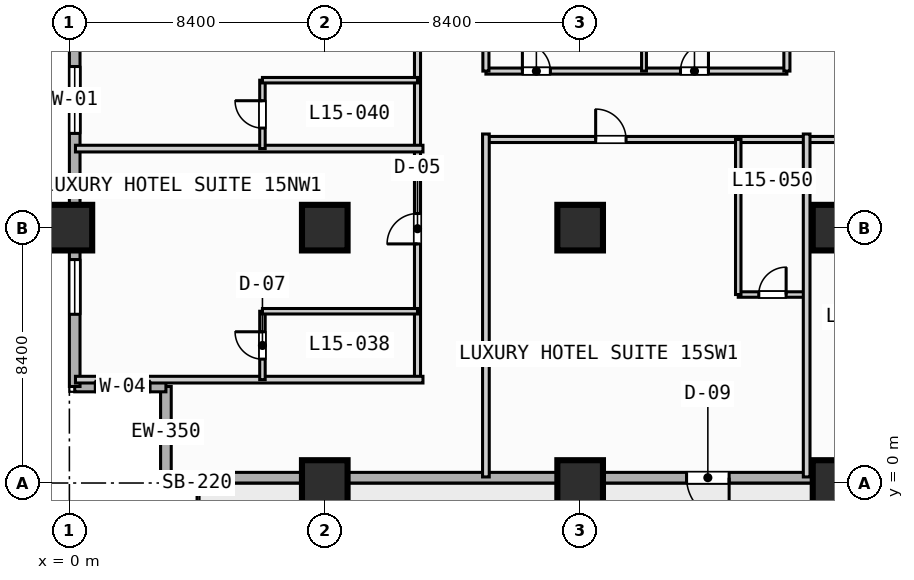
"""IFC4 building model, lengths in metres.
Left out: names, types, materials, properties, quantities, classifications, styles, units other than length and angle.
Written with IfcOpenShell. Run it as: python <this file> out.ifc"""

import sys

from ifc_helpers import new_model, si_unit, direction, frame, frame_2d, origin, origin_2d, place, context, subcontext, project, spatial, rectangle, extrude, element, fill, save


model = new_model("IFC4")
c1 = context("Model", 3, precision=1e-05, world=origin(), true_north=direction((0.0, 1.0)))
c2 = subcontext(c1, "Body", "Model", "MODEL_VIEW")
j1 = project(units=[si_unit("LENGTHUNIT", "METRE"), si_unit("PLANEANGLEUNIT", "RADIAN")], contexts=[c1])
p1 = place(None, origin())
s1 = spatial("IfcSite", under=j1, at=p1, CompositionType="ELEMENT")
p2 = place(p1, origin())
s2 = spatial("IfcBuilding", under=s1, at=p2, CompositionType="ELEMENT")
p3 = place(p2, frame((0.0, 0.0, 66.2)))
s3 = spatial("IfcBuildingStorey", under=s2, at=p3, CompositionType="ELEMENT", Elevation=66.2)
for number, where, z_axis, x_axis in (
    (1, (0.0, 8.4, 0.0), (0.0, 0.0, 1.0), (1.0, 0.0, 0.0)),
    (2, (8.4, 0.0, 0.0), (0.0, 0.0, 1.0), (1.0, 0.0, 0.0)),
    (3, (8.4, 8.4, 0.0), (0.0, 0.0, 1.0), (1.0, 0.0, 0.0)),
    (4, (16.8, 0.0, 0.0), (0.0, 0.0, 1.0), (1.0, 0.0, 0.0)),
    (5, (16.8, 8.4, 0.0), (0.0, 0.0, 1.0), (1.0, 0.0, 0.0)),
    (6, (25.2, 0.0, 0.0), (0.0, 0.0, 1.0), (1.0, 0.0, 0.0)),
    (7, (25.2, 8.4, 0.0), (0.0, 0.0, 1.0), (1.0, 0.0, 0.0)),
):
    element("IfcColumn", number, at=place(p3, frame(where, z_axis=z_axis, x_axis=x_axis)), inside=s3, PredefinedType="COLUMN", context=c2, shape_type="SweptSolid", body=[
        extrude(rectangle(XDim=1.5, YDim=1.5, at=origin_2d()), origin(), (0.0, 0.0, 1.0), 3.8),
    ])
p4 = place(p3, frame((3.175, 0.175, 0.0), z_axis=(0.0, 0.0, 1.0), x_axis=(0.0, 1.0, 0.0)))
e8 = element("IfcWall", 8, at=p4, inside=s3, PredefinedType="STANDARD", context=c2, shape_type="SweptSolid", body=[
    extrude(rectangle(XDim=3.0, YDim=0.35, at=frame_2d((1.5, 0.0))), origin(), (0.0, 0.0, 1.0), 3.55),
])
p5 = place(p3, frame((3.175, 3.175, 0.0), z_axis=(0.0, 0.0, 1.0), x_axis=(-1.0, 0.0, 0.0)))
e9 = element("IfcWall", 9, at=p5, inside=s3, PredefinedType="STANDARD", context=c2, shape_type="SweptSolid", body=[
    extrude(rectangle(XDim=3.0, YDim=0.35, at=frame_2d((1.5, 0.0))), origin(), (0.0, 0.0, 1.0), 3.55),
])
p6 = place(p5, frame((0.522, 0.0, 0.85)))
e10 = element("IfcOpeningElement", 10, at=p6, cuts=e9, PredefinedType="OPENING", context=c2, shape_type="SweptSolid", body=[
    extrude(rectangle(XDim=1.8, YDim=1.8, at=frame_2d((0.9, 0.9))), frame((0.0, 0.185, 0.0), z_axis=(0.0, -1.0, 0.0), x_axis=(1.0, 0.0, 0.0)), (0.0, 0.0, 1.0), 0.37),
])
p7 = place(p3, frame((0.175, 3.175, 0.0), z_axis=(0.0, 0.0, 1.0), x_axis=(0.0, 1.0, 0.0)))
e11 = element("IfcWall", 11, at=p7, inside=s3, PredefinedType="STANDARD", context=c2, shape_type="SweptSolid", body=[
    extrude(rectangle(XDim=86.05, YDim=0.35, at=frame_2d((43.025, 0.0))), origin(), (0.0, 0.0, 1.0), 3.55),
])
p8 = place(p7, frame((42.325, 0.0, 0.0)))
e12 = element("IfcOpeningElement", 12, at=p8, cuts=e11, PredefinedType="OPENING", context=c2, shape_type="SweptSolid", body=[
    extrude(rectangle(XDim=1.4, YDim=2.2, at=frame_2d((0.7, 1.1))), frame((0.0, 0.185, 0.0), z_axis=(0.0, -1.0, 0.0), x_axis=(1.0, 0.0, 0.0)), (0.0, 0.0, 1.0), 0.37),
])
p9 = place(p7, frame((8.325, 0.0, 0.85)))
e13 = element("IfcOpeningElement", 13, at=p9, cuts=e11, PredefinedType="OPENING", context=c2, shape_type="SweptSolid", body=[
    extrude(rectangle(XDim=2.2, YDim=1.8, at=frame_2d((1.1, 0.9))), frame((0.0, 0.185, 0.0), z_axis=(0.0, -1.0, 0.0), x_axis=(1.0, 0.0, 0.0)), (0.0, 0.0, 1.0), 0.37),
])
p10 = place(p7, frame((16.725, 0.0, 0.85)))
e14 = element("IfcOpeningElement", 14, at=p10, cuts=e11, PredefinedType="OPENING", context=c2, shape_type="SweptSolid", body=[
    extrude(rectangle(XDim=2.2, YDim=1.8, at=frame_2d((1.1, 0.9))), frame((0.0, 0.185, 0.0), z_axis=(0.0, -1.0, 0.0), x_axis=(1.0, 0.0, 0.0)), (0.0, 0.0, 1.0), 0.37),
])
p11 = place(p7, frame((25.125, 0.0, 0.85)))
e15 = element("IfcOpeningElement", 15, at=p11, cuts=e11, PredefinedType="OPENING", context=c2, shape_type="SweptSolid", body=[
    extrude(rectangle(XDim=2.2, YDim=1.8, at=frame_2d((1.1, 0.9))), frame((0.0, 0.185, 0.0), z_axis=(0.0, -1.0, 0.0), x_axis=(1.0, 0.0, 0.0)), (0.0, 0.0, 1.0), 0.37),
])
p12 = place(p7, frame((33.525, 0.0, 0.85)))
e16 = element("IfcOpeningElement", 16, at=p12, cuts=e11, PredefinedType="OPENING", context=c2, shape_type="SweptSolid", body=[
    extrude(rectangle(XDim=2.2, YDim=1.8, at=frame_2d((1.1, 0.9))), frame((0.0, 0.185, 0.0), z_axis=(0.0, -1.0, 0.0), x_axis=(1.0, 0.0, 0.0)), (0.0, 0.0, 1.0), 0.37),
])
p13 = place(p7, frame((2.375, 0.0, 0.85)))
e17 = element("IfcOpeningElement", 17, at=p13, cuts=e11, PredefinedType="OPENING", context=c2, shape_type="SweptSolid", body=[
    extrude(rectangle(XDim=1.8, YDim=1.8, at=frame_2d((0.9, 0.9))), frame((0.0, 0.185, 0.0), z_axis=(0.0, -1.0, 0.0), x_axis=(1.0, 0.0, 0.0)), (0.0, 0.0, 1.0), 0.37),
])
p14 = place(p7, frame((56.475, 0.0, 0.85)))
e18 = element("IfcOpeningElement", 18, at=p14, cuts=e11, PredefinedType="OPENING", context=c2, shape_type="SweptSolid", body=[
    extrude(rectangle(XDim=1.8, YDim=1.8, at=frame_2d((0.9, 0.9))), frame((0.0, 0.185, 0.0), z_axis=(0.0, -1.0, 0.0), x_axis=(1.0, 0.0, 0.0)), (0.0, 0.0, 1.0), 0.37),
])
p15 = place(p3, frame((89.225, 0.175, 0.0), z_axis=(0.0, 0.0, 1.0), x_axis=(-1.0, 0.0, 0.0)))
e19 = element("IfcWall", 19, at=p15, inside=s3, PredefinedType="STANDARD", context=c2, shape_type="SweptSolid", body=[
    extrude(rectangle(XDim=86.05, YDim=0.35, at=frame_2d((43.025, 0.0))), origin(), (0.0, 0.0, 1.0), 3.55),
])
p16 = place(p15, frame((67.525, 0.0, 0.0)))
e20 = element("IfcOpeningElement", 20, at=p16, cuts=e19, PredefinedType="OPENING", context=c2, shape_type="SweptSolid", body=[
    extrude(rectangle(XDim=1.4, YDim=2.2, at=frame_2d((0.7, 1.1))), frame((0.0, 0.185, 0.0), z_axis=(0.0, -1.0, 0.0), x_axis=(1.0, 0.0, 0.0)), (0.0, 0.0, 1.0), 0.37),
])
p17 = place(p15, frame((58.725, 0.0, 0.85)))
e21 = element("IfcOpeningElement", 21, at=p17, cuts=e19, PredefinedType="OPENING", context=c2, shape_type="SweptSolid", body=[
    extrude(rectangle(XDim=2.2, YDim=1.8, at=frame_2d((1.1, 0.9))), frame((0.0, 0.185, 0.0), z_axis=(0.0, -1.0, 0.0), x_axis=(1.0, 0.0, 0.0)), (0.0, 0.0, 1.0), 0.37),
])
p18 = place(p15, frame((50.325, 0.0, 0.85)))
e22 = element("IfcOpeningElement", 22, at=p18, cuts=e19, PredefinedType="OPENING", context=c2, shape_type="SweptSolid", body=[
    extrude(rectangle(XDim=2.2, YDim=1.8, at=frame_2d((1.1, 0.9))), frame((0.0, 0.185, 0.0), z_axis=(0.0, -1.0, 0.0), x_axis=(1.0, 0.0, 0.0)), (0.0, 0.0, 1.0), 0.37),
])
p19 = place(p15, frame((41.925, 0.0, 0.85)))
e23 = element("IfcOpeningElement", 23, at=p19, cuts=e19, PredefinedType="OPENING", context=c2, shape_type="SweptSolid", body=[
    extrude(rectangle(XDim=2.2, YDim=1.8, at=frame_2d((1.1, 0.9))), frame((0.0, 0.185, 0.0), z_axis=(0.0, -1.0, 0.0), x_axis=(1.0, 0.0, 0.0)), (0.0, 0.0, 1.0), 0.37),
])
p20 = place(p15, frame((27.675, 0.0, 0.85)))
e24 = element("IfcOpeningElement", 24, at=p20, cuts=e19, PredefinedType="OPENING", context=c2, shape_type="SweptSolid", body=[
    extrude(rectangle(XDim=1.8, YDim=1.8, at=frame_2d((0.9, 0.9))), frame((0.0, 0.185, 0.0), z_axis=(0.0, -1.0, 0.0), x_axis=(1.0, 0.0, 0.0)), (0.0, 0.0, 1.0), 0.37),
])
p21 = place(p3, frame((13.7, 13.55, 0.0), z_axis=(0.0, 0.0, 1.0), x_axis=(1.0, 0.0, 0.0)))
e25 = element("IfcWall", 25, at=p21, inside=s3, PredefinedType="PARTITIONING", context=c2, shape_type="SweptSolid", body=[
    extrude(rectangle(XDim=9.9, YDim=0.2, at=frame_2d((4.95, 0.0))), origin(), (0.0, 0.0, 1.0), 3.55),
])
p22 = place(p21, frame((1.2, 0.0, 0.0)))
e26 = element("IfcOpeningElement", 26, at=p22, cuts=e25, PredefinedType="OPENING", context=c2, shape_type="SweptSolid", body=[
    extrude(rectangle(XDim=0.92, YDim=2.1, at=frame_2d((0.46, 1.05))), frame((0.0, 0.11, 0.0), z_axis=(0.0, -1.0, 0.0), x_axis=(1.0, 0.0, 0.0)), (0.0, 0.0, 1.0), 0.22),
])
p23 = place(p21, frame((6.4, 0.0, 0.0)))
e27 = element("IfcOpeningElement", 27, at=p23, cuts=e25, PredefinedType="OPENING", context=c2, shape_type="SweptSolid", body=[
    extrude(rectangle(XDim=0.92, YDim=2.1, at=frame_2d((0.46, 1.05))), frame((0.0, 0.11, 0.0), z_axis=(0.0, -1.0, 0.0), x_axis=(1.0, 0.0, 0.0)), (0.0, 0.0, 1.0), 0.22),
])
p24 = place(p3, frame((18.9, 13.55, 0.0), z_axis=(0.0, 0.0, 1.0), x_axis=(0.0, 1.0, 0.0)))
e28 = element("IfcWall", 28, at=p24, inside=s3, PredefinedType="PARTITIONING", context=c2, shape_type="SweptSolid", body=[
    extrude(rectangle(XDim=11.45, YDim=0.16, at=frame_2d((5.725, 0.0))), origin(), (0.0, 0.0, 1.0), 3.55),
])
for number, where, z_axis, x_axis in (
    (29, (13.7, 13.55, 0.0), (0.0, 0.0, 1.0), (0.0, 1.0, 0.0)),
    (30, (23.6, 13.55, 0.0), (0.0, 0.0, 1.0), (0.0, 1.0, 0.0)),
):
    element("IfcWall", number, at=place(p3, frame(where, z_axis=z_axis, x_axis=x_axis)), inside=s3, PredefinedType="PARTITIONING", context=c2, shape_type="SweptSolid", body=[
        extrude(rectangle(XDim=11.45, YDim=0.2, at=frame_2d((5.725, 0.0))), origin(), (0.0, 0.0, 1.0), 3.55),
    ])
p25 = place(p3, frame((11.45, 3.4, 0.0), z_axis=(0.0, 0.0, 1.0), x_axis=(0.0, 1.0, 0.0)))
e31 = element("IfcWall", 31, at=p25, inside=s3, PredefinedType="PARTITIONING", context=c2, shape_type="SweptSolid", body=[
    extrude(rectangle(XDim=60.4, YDim=0.2, at=frame_2d((30.2, 0.0))), origin(), (0.0, 0.0, 1.0), 3.55),
])
p26 = place(p25, frame((4.465, 0.0, 0.0)))
e32 = element("IfcOpeningElement", 32, at=p26, cuts=e31, PredefinedType="OPENING", context=c2, shape_type="SweptSolid", body=[
    extrude(rectangle(XDim=1.0, YDim=2.15, at=frame_2d((0.5, 1.075))), frame((0.0, 0.11, 0.0), z_axis=(0.0, -1.0, 0.0), x_axis=(1.0, 0.0, 0.0)), (0.0, 0.0, 1.0), 0.22),
])
p27 = place(p25, frame((14.665, 0.0, 0.0)))
e33 = element("IfcOpeningElement", 33, at=p27, cuts=e31, PredefinedType="OPENING", context=c2, shape_type="SweptSolid", body=[
    extrude(rectangle(XDim=1.0, YDim=2.15, at=frame_2d((0.5, 1.075))), frame((0.0, 0.11, 0.0), z_axis=(0.0, -1.0, 0.0), x_axis=(1.0, 0.0, 0.0)), (0.0, 0.0, 1.0), 0.22),
])
p28 = place(p25, frame((22.535, 0.0, 0.0)))
e34 = element("IfcOpeningElement", 34, at=p28, cuts=e31, PredefinedType="OPENING", context=c2, shape_type="SweptSolid", body=[
    extrude(rectangle(XDim=1.0, YDim=2.15, at=frame_2d((0.5, 1.075))), frame((0.0, 0.11, 0.0), z_axis=(0.0, -1.0, 0.0), x_axis=(1.0, 0.0, 0.0)), (0.0, 0.0, 1.0), 0.22),
])
p29 = place(p25, frame((31.16, 0.0, 0.0)))
e35 = element("IfcOpeningElement", 35, at=p29, cuts=e31, PredefinedType="OPENING", context=c2, shape_type="SweptSolid", body=[
    extrude(rectangle(XDim=1.0, YDim=2.15, at=frame_2d((0.5, 1.075))), frame((0.0, 0.11, 0.0), z_axis=(0.0, -1.0, 0.0), x_axis=(1.0, 0.0, 0.0)), (0.0, 0.0, 1.0), 0.22),
])
p30 = place(p25, frame((42.36, 0.0, 0.0)))
e36 = element("IfcOpeningElement", 36, at=p30, cuts=e31, PredefinedType="OPENING", context=c2, shape_type="SweptSolid", body=[
    extrude(rectangle(XDim=1.0, YDim=2.15, at=frame_2d((0.5, 1.075))), frame((0.0, 0.11, 0.0), z_axis=(0.0, -1.0, 0.0), x_axis=(1.0, 0.0, 0.0)), (0.0, 0.0, 1.0), 0.22),
])
p31 = place(p25, frame((56.065, 0.0, 0.0)))
e37 = element("IfcOpeningElement", 37, at=p31, cuts=e31, PredefinedType="OPENING", context=c2, shape_type="SweptSolid", body=[
    extrude(rectangle(XDim=1.0, YDim=2.15, at=frame_2d((0.5, 1.075))), frame((0.0, 0.11, 0.0), z_axis=(0.0, -1.0, 0.0), x_axis=(1.0, 0.0, 0.0)), (0.0, 0.0, 1.0), 0.22),
])
p32 = place(p3, frame((0.2, 3.4, 0.0), z_axis=(0.0, 0.0, 1.0), x_axis=(1.0, 0.0, 0.0)))
e38 = element("IfcWall", 38, at=p32, inside=s3, PredefinedType="PARTITIONING", context=c2, shape_type="SweptSolid", body=[
    extrude(rectangle(XDim=11.43, YDim=0.22, at=frame_2d((5.715, 0.0))), origin(), (0.0, 0.0, 1.0), 3.55),
])
p33 = place(p3, frame((6.35, 3.4, 0.0), z_axis=(0.0, 0.0, 1.0), x_axis=(0.0, 1.0, 0.0)))
e39 = element("IfcWall", 39, at=p33, inside=s3, PredefinedType="PLUMBINGWALL", context=c2, shape_type="SweptSolid", body=[
    extrude(rectangle(XDim=2.25, YDim=0.18, at=frame_2d((1.125, 0.0))), origin(), (0.0, 0.0, 1.0), 3.55),
])
p34 = place(p33, frame((0.675, 0.0, 0.0)))
e40 = element("IfcOpeningElement", 40, at=p34, cuts=e39, PredefinedType="OPENING", context=c2, shape_type="SweptSolid", body=[
    extrude(rectangle(XDim=0.9, YDim=2.1, at=frame_2d((0.45, 1.05))), frame((0.0, 0.1, 0.0), z_axis=(0.0, -1.0, 0.0), x_axis=(1.0, 0.0, 0.0)), (0.0, 0.0, 1.0), 0.2),
])
p35 = place(p3, frame((6.35, 5.65, 0.0), z_axis=(0.0, 0.0, 1.0), x_axis=(1.0, 0.0, 0.0)))
e41 = element("IfcWall", 41, at=p35, inside=s3, PredefinedType="PLUMBINGWALL", context=c2, shape_type="SweptSolid", body=[
    extrude(rectangle(XDim=5.1, YDim=0.18, at=frame_2d((2.55, 0.0))), origin(), (0.0, 0.0, 1.0), 3.55),
])
p36 = place(p3, frame((0.2, 11.0, 0.0), z_axis=(0.0, 0.0, 1.0), x_axis=(1.0, 0.0, 0.0)))
e42 = element("IfcWall", 42, at=p36, inside=s3, PredefinedType="PARTITIONING", context=c2, shape_type="SweptSolid", body=[
    extrude(rectangle(XDim=11.43, YDim=0.22, at=frame_2d((5.715, 0.0))), origin(), (0.0, 0.0, 1.0), 3.55),
])
p37 = place(p3, frame((6.35, 11.0, 0.0), z_axis=(0.0, 0.0, 1.0), x_axis=(0.0, 1.0, 0.0)))
e43 = element("IfcWall", 43, at=p37, inside=s3, PredefinedType="PLUMBINGWALL", context=c2, shape_type="SweptSolid", body=[
    extrude(rectangle(XDim=2.25, YDim=0.18, at=frame_2d((1.125, 0.0))), origin(), (0.0, 0.0, 1.0), 3.55),
])
p38 = place(p37, frame((0.675, 0.0, 0.0)))
e44 = element("IfcOpeningElement", 44, at=p38, cuts=e43, PredefinedType="OPENING", context=c2, shape_type="SweptSolid", body=[
    extrude(rectangle(XDim=0.9, YDim=2.1, at=frame_2d((0.45, 1.05))), frame((0.0, 0.1, 0.0), z_axis=(0.0, -1.0, 0.0), x_axis=(1.0, 0.0, 0.0)), (0.0, 0.0, 1.0), 0.2),
])
p39 = place(p3, frame((6.35, 13.25, 0.0), z_axis=(0.0, 0.0, 1.0), x_axis=(1.0, 0.0, 0.0)))
e45 = element("IfcWall", 45, at=p39, inside=s3, PredefinedType="PLUMBINGWALL", context=c2, shape_type="SweptSolid", body=[
    extrude(rectangle(XDim=5.1, YDim=0.18, at=frame_2d((2.55, 0.0))), origin(), (0.0, 0.0, 1.0), 3.55),
])
p40 = place(p3, frame((13.7, 11.3, 0.0), z_axis=(0.0, 0.0, 1.0), x_axis=(1.0, 0.0, 0.0)))
e46 = element("IfcWall", 46, at=p40, inside=s3, PredefinedType="PARTITIONING", context=c2, shape_type="SweptSolid", body=[
    extrude(rectangle(XDim=50.1, YDim=0.2, at=frame_2d((25.05, 0.0))), origin(), (0.0, 0.0, 1.0), 3.55),
])
p41 = place(p40, frame((3.61, 0.0, 0.0)))
e47 = element("IfcOpeningElement", 47, at=p41, cuts=e46, PredefinedType="OPENING", context=c2, shape_type="SweptSolid", body=[
    extrude(rectangle(XDim=1.0, YDim=2.15, at=frame_2d((0.5, 1.075))), frame((0.0, 0.11, 0.0), z_axis=(0.0, -1.0, 0.0), x_axis=(1.0, 0.0, 0.0)), (0.0, 0.0, 1.0), 0.22),
])
p42 = place(p40, frame((16.81, 0.0, 0.0)))
e48 = element("IfcOpeningElement", 48, at=p42, cuts=e46, PredefinedType="OPENING", context=c2, shape_type="SweptSolid", body=[
    extrude(rectangle(XDim=1.0, YDim=2.15, at=frame_2d((0.5, 1.075))), frame((0.0, 0.11, 0.0), z_axis=(0.0, -1.0, 0.0), x_axis=(1.0, 0.0, 0.0)), (0.0, 0.0, 1.0), 0.22),
])
p43 = place(p40, frame((31.935, 0.0, 0.0)))
e49 = element("IfcOpeningElement", 49, at=p43, cuts=e46, PredefinedType="OPENING", context=c2, shape_type="SweptSolid", body=[
    extrude(rectangle(XDim=1.0, YDim=2.15, at=frame_2d((0.5, 1.075))), frame((0.0, 0.11, 0.0), z_axis=(0.0, -1.0, 0.0), x_axis=(1.0, 0.0, 0.0)), (0.0, 0.0, 1.0), 0.22),
])
p44 = place(p40, frame((43.785, 0.0, 0.0)))
e50 = element("IfcOpeningElement", 50, at=p44, cuts=e46, PredefinedType="OPENING", context=c2, shape_type="SweptSolid", body=[
    extrude(rectangle(XDim=1.0, YDim=2.15, at=frame_2d((0.5, 1.075))), frame((0.0, 0.11, 0.0), z_axis=(0.0, -1.0, 0.0), x_axis=(1.0, 0.0, 0.0)), (0.0, 0.0, 1.0), 0.22),
])
p45 = place(p3, frame((13.7, 0.2, 0.0), z_axis=(0.0, 0.0, 1.0), x_axis=(0.0, 1.0, 0.0)))
e51 = element("IfcWall", 51, at=p45, inside=s3, PredefinedType="PARTITIONING", context=c2, shape_type="SweptSolid", body=[
    extrude(rectangle(XDim=11.28, YDim=0.22, at=frame_2d((5.64, 0.0))), origin(), (0.0, 0.0, 1.0), 3.55),
])
p46 = place(p3, frame((22.0, 6.2, 0.0), z_axis=(0.0, 0.0, 1.0), x_axis=(1.0, 0.0, 0.0)))
e52 = element("IfcWall", 52, at=p46, inside=s3, PredefinedType="PLUMBINGWALL", context=c2, shape_type="SweptSolid", body=[
    extrude(rectangle(XDim=2.25, YDim=0.18, at=frame_2d((1.125, 0.0))), origin(), (0.0, 0.0, 1.0), 3.55),
])
p47 = place(p46, frame((0.675, 0.0, 0.0)))
e53 = element("IfcOpeningElement", 53, at=p47, cuts=e52, PredefinedType="OPENING", context=c2, shape_type="SweptSolid", body=[
    extrude(rectangle(XDim=0.9, YDim=2.1, at=frame_2d((0.45, 1.05))), frame((0.0, 0.1, 0.0), z_axis=(0.0, -1.0, 0.0), x_axis=(1.0, 0.0, 0.0)), (0.0, 0.0, 1.0), 0.2),
])
p48 = place(p3, frame((22.0, 6.2, 0.0), z_axis=(0.0, 0.0, 1.0), x_axis=(0.0, 1.0, 0.0)))
e54 = element("IfcWall", 54, at=p48, inside=s3, PredefinedType="PLUMBINGWALL", context=c2, shape_type="SweptSolid", body=[
    extrude(rectangle(XDim=5.1, YDim=0.18, at=frame_2d((2.55, 0.0))), origin(), (0.0, 0.0, 1.0), 3.55),
])
p49 = place(p3, frame((24.25, 0.2, 0.0), z_axis=(0.0, 0.0, 1.0), x_axis=(0.0, 1.0, 0.0)))
e55 = element("IfcWall", 55, at=p49, inside=s3, PredefinedType="PARTITIONING", context=c2, shape_type="SweptSolid", body=[
    extrude(rectangle(XDim=11.28, YDim=0.22, at=frame_2d((5.64, 0.0))), origin(), (0.0, 0.0, 1.0), 3.55),
])
p50 = place(p6, origin())
e56 = element("IfcWindow", 56, at=p50, inside=s3, PartitioningType="SINGLE_PANEL", PredefinedType="WINDOW", context=c2, shape_type="SweptSolid", body=[
    extrude(rectangle(XDim=1.8, YDim=1.8, at=frame_2d((0.9, 0.9))), frame((0.0, 0.03, 0.0), z_axis=(0.0, -1.0, 0.0), x_axis=(1.0, 0.0, 0.0)), (0.0, 0.0, 1.0), 0.06),
])
fill(e10, e56)
p51 = place(p9, origin())
e57 = element("IfcWindow", 57, at=p51, inside=s3, PartitioningType="SINGLE_PANEL", PredefinedType="WINDOW", context=c2, shape_type="SweptSolid", body=[
    extrude(rectangle(XDim=2.2, YDim=1.8, at=frame_2d((1.1, 0.9))), frame((0.0, 0.03, 0.0), z_axis=(0.0, -1.0, 0.0), x_axis=(1.0, 0.0, 0.0)), (0.0, 0.0, 1.0), 0.06),
])
fill(e13, e57)
p52 = place(p13, origin())
e58 = element("IfcWindow", 58, at=p52, inside=s3, PartitioningType="SINGLE_PANEL", PredefinedType="WINDOW", context=c2, shape_type="SweptSolid", body=[
    extrude(rectangle(XDim=1.8, YDim=1.8, at=frame_2d((0.9, 0.9))), frame((0.0, 0.03, 0.0), z_axis=(0.0, -1.0, 0.0), x_axis=(1.0, 0.0, 0.0)), (0.0, 0.0, 1.0), 0.06),
])
fill(e17, e58)
p53 = place(p16, origin())
e59 = element("IfcDoor", 59, at=p53, inside=s3, OperationType="SINGLE_SWING_LEFT", PredefinedType="DOOR", context=c2, shape_type="SweptSolid", body=[
    extrude(rectangle(XDim=1.4, YDim=2.2, at=frame_2d((0.7, 1.1))), frame((0.0, 0.025, 0.0), z_axis=(0.0, -1.0, 0.0), x_axis=(1.0, 0.0, 0.0)), (0.0, 0.0, 1.0), 0.05),
])
fill(e20, e59)
p54 = place(p22, origin())
e60 = element("IfcDoor", 60, at=p54, inside=s3, OperationType="SINGLE_SWING_LEFT", PredefinedType="DOOR", context=c2, shape_type="SweptSolid", body=[
    extrude(rectangle(XDim=0.92, YDim=2.1, at=frame_2d((0.46, 1.05))), frame((0.0, 0.025, 0.0), z_axis=(0.0, -1.0, 0.0), x_axis=(1.0, 0.0, 0.0)), (0.0, 0.0, 1.0), 0.05),
])
fill(e26, e60)
p55 = place(p23, origin())
e61 = element("IfcDoor", 61, at=p55, inside=s3, OperationType="SINGLE_SWING_RIGHT", PredefinedType="DOOR", context=c2, shape_type="SweptSolid", body=[
    extrude(rectangle(XDim=0.92, YDim=2.1, at=frame_2d((0.46, 1.05))), frame((0.0, 0.025, 0.0), z_axis=(0.0, -1.0, 0.0), x_axis=(1.0, 0.0, 0.0)), (0.0, 0.0, 1.0), 0.05),
])
fill(e27, e61)
p56 = place(p26, origin())
e62 = element("IfcDoor", 62, at=p56, inside=s3, OperationType="SINGLE_SWING_LEFT", PredefinedType="DOOR", context=c2, shape_type="SweptSolid", body=[
    extrude(rectangle(XDim=1.0, YDim=2.15, at=frame_2d((0.5, 1.075))), frame((0.0, 0.025, 0.0), z_axis=(0.0, -1.0, 0.0), x_axis=(1.0, 0.0, 0.0)), (0.0, 0.0, 1.0), 0.05),
])
fill(e32, e62)
p57 = place(p34, origin())
e63 = element("IfcDoor", 63, at=p57, inside=s3, OperationType="SINGLE_SWING_RIGHT", PredefinedType="DOOR", context=c2, shape_type="SweptSolid", body=[
    extrude(rectangle(XDim=0.9, YDim=2.1, at=frame_2d((0.45, 1.05))), frame((0.0, 0.025, 0.0), z_axis=(0.0, -1.0, 0.0), x_axis=(1.0, 0.0, 0.0)), (0.0, 0.0, 1.0), 0.05),
])
fill(e40, e63)
p58 = place(p38, origin())
e64 = element("IfcDoor", 64, at=p58, inside=s3, OperationType="SINGLE_SWING_RIGHT", PredefinedType="DOOR", context=c2, shape_type="SweptSolid", body=[
    extrude(rectangle(XDim=0.9, YDim=2.1, at=frame_2d((0.45, 1.05))), frame((0.0, 0.025, 0.0), z_axis=(0.0, -1.0, 0.0), x_axis=(1.0, 0.0, 0.0)), (0.0, 0.0, 1.0), 0.05),
])
fill(e44, e64)
p59 = place(p41, origin())
e65 = element("IfcDoor", 65, at=p59, inside=s3, OperationType="SINGLE_SWING_LEFT", PredefinedType="DOOR", context=c2, shape_type="SweptSolid", body=[
    extrude(rectangle(XDim=1.0, YDim=2.15, at=frame_2d((0.5, 1.075))), frame((0.0, 0.025, 0.0), z_axis=(0.0, -1.0, 0.0), x_axis=(1.0, 0.0, 0.0)), (0.0, 0.0, 1.0), 0.05),
])
fill(e47, e65)
p60 = place(p47, origin())
e66 = element("IfcDoor", 66, at=p60, inside=s3, OperationType="SINGLE_SWING_RIGHT", PredefinedType="DOOR", context=c2, shape_type="SweptSolid", body=[
    extrude(rectangle(XDim=0.9, YDim=2.1, at=frame_2d((0.45, 1.05))), frame((0.0, 0.025, 0.0), z_axis=(0.0, -1.0, 0.0), x_axis=(1.0, 0.0, 0.0)), (0.0, 0.0, 1.0), 0.05),
])
fill(e53, e66)
save(model, sys.argv[1])
